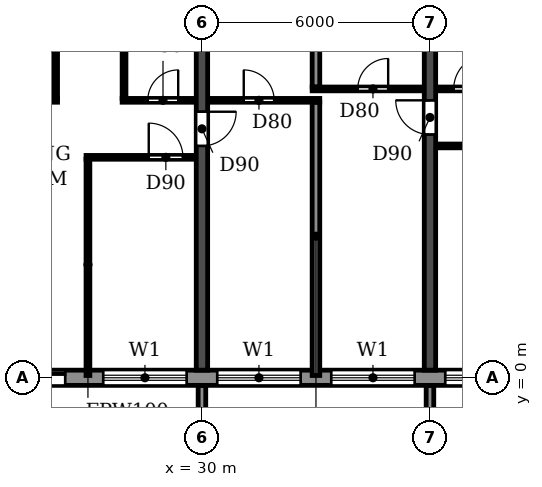
"""IFC4 building model, lengths in metres.
Left out: names, types, materials, properties, quantities, classifications, styles, units other than length and angle.
Written with IfcOpenShell. Run it as: python <this file> out.ifc"""

import sys

from ifc_helpers import new_model, si_unit, direction, frame, frame_2d, origin, place, context, subcontext, project, spatial, polyline, rectangle, outline, extrude, source, transform, mapped, element, fill, save


model = new_model("IFC4")
c1 = context("Model", 3, precision=1e-05, world=origin(), true_north=direction((0.0, 1.0)))
c2 = subcontext(c1, "Body", "Model", "MODEL_VIEW")
j1 = project(units=[si_unit("LENGTHUNIT", "METRE"), si_unit("PLANEANGLEUNIT", "RADIAN")], contexts=[c1])
p1 = place(None, origin())
s1 = spatial("IfcSite", under=j1, at=p1, CompositionType="ELEMENT")
p2 = place(p1, origin())
s2 = spatial("IfcBuilding", under=s1, at=p2, CompositionType="ELEMENT")
p3 = place(p2, frame((0.0, 0.0, 152.1)))
s3 = spatial("IfcBuildingStorey", under=s2, at=p3, CompositionType="ELEMENT", Elevation=152.1)
p4 = place(p3, frame((30.0, 0.2, 0.0), z_axis=(0.0, 0.0, 1.0), x_axis=(0.0, 1.0, 0.0)))
e1 = element("IfcWall", 1, at=p4, inside=s3, PredefinedType="SHEAR", context=c2, shape_type="SweptSolid", body=[
    extrude(rectangle(XDim=11.675, YDim=0.3, at=frame_2d((5.837, 0.0))), origin(), (0.0, 0.0, 1.0), 3.07),
])
p5 = place(p4, frame((5.9, 0.0, 0.0)))
e2 = element("IfcOpeningElement", 2, at=p5, cuts=e1, PredefinedType="OPENING", context=c2, shape_type="SweptSolid", body=[
    extrude(rectangle(XDim=0.9, YDim=2.1, at=frame_2d((0.45, 1.05))), frame((0.0, 0.16, 0.0), z_axis=(0.0, -1.0, 0.0), x_axis=(1.0, 0.0, 0.0)), (0.0, 0.0, 1.0), 0.32),
])
p6 = place(p3, frame((36.0, 0.2, 0.0), z_axis=(0.0, 0.0, 1.0), x_axis=(0.0, 1.0, 0.0)))
e3 = element("IfcWall", 3, at=p6, inside=s3, PredefinedType="SHEAR", context=c2, shape_type="SweptSolid", body=[
    extrude(rectangle(XDim=11.675, YDim=0.3, at=frame_2d((5.837, 0.0))), origin(), (0.0, 0.0, 1.0), 3.07),
])
p7 = place(p6, frame((6.2, 0.0, 0.0)))
e4 = element("IfcOpeningElement", 4, at=p7, cuts=e3, PredefinedType="OPENING", context=c2, shape_type="SweptSolid", body=[
    extrude(rectangle(XDim=0.9, YDim=2.1, at=frame_2d((0.45, 1.05))), frame((0.0, 0.16, 0.0), z_axis=(0.0, -1.0, 0.0), x_axis=(1.0, 0.0, 0.0)), (0.0, 0.0, 1.0), 0.32),
])
p8 = place(p3, frame((16.683, 0.0, 0.0), z_axis=(0.0, 0.0, 1.0), x_axis=(1.0, 0.0, 0.0)))
e5 = element("IfcWall", 5, at=p8, inside=s3, PredefinedType="STANDARD", context=c2, shape_type="SweptSolid", body=[
    extrude(rectangle(XDim=68.634, YDim=0.4, at=frame_2d((34.317, 0.0))), origin(), (0.0, 0.0, 1.0), 3.07),
])
p9 = place(p8, frame((1.717, 0.0, 0.9)))
e6 = element("IfcOpeningElement", 6, at=p9, cuts=e5, PredefinedType="OPENING", context=c2, shape_type="SweptSolid", body=[
    extrude(rectangle(XDim=2.2, YDim=1.5, at=frame_2d((1.1, 0.75))), frame((0.0, 0.21, 0.0), z_axis=(0.0, -1.0, 0.0), x_axis=(1.0, 0.0, 0.0)), (0.0, 0.0, 1.0), 0.42),
])
p10 = place(p8, frame((4.717, 0.0, 0.9)))
e7 = element("IfcOpeningElement", 7, at=p10, cuts=e5, PredefinedType="OPENING", context=c2, shape_type="SweptSolid", body=[
    extrude(rectangle(XDim=2.2, YDim=1.5, at=frame_2d((1.1, 0.75))), frame((0.0, 0.21, 0.0), z_axis=(0.0, -1.0, 0.0), x_axis=(1.0, 0.0, 0.0)), (0.0, 0.0, 1.0), 0.42),
])
p11 = place(p8, frame((7.917, 0.0, 0.0)))
e8 = element("IfcOpeningElement", 8, at=p11, cuts=e5, PredefinedType="OPENING", context=c2, shape_type="SweptSolid", body=[
    extrude(rectangle(XDim=1.8, YDim=2.4, at=frame_2d((0.9, 1.2))), frame((0.0, 0.21, 0.0), z_axis=(0.0, -1.0, 0.0), x_axis=(1.0, 0.0, 0.0)), (0.0, 0.0, 1.0), 0.42),
])
p12 = place(p8, frame((10.717, 0.0, 0.9)))
e9 = element("IfcOpeningElement", 9, at=p12, cuts=e5, PredefinedType="OPENING", context=c2, shape_type="SweptSolid", body=[
    extrude(rectangle(XDim=2.2, YDim=1.5, at=frame_2d((1.1, 0.75))), frame((0.0, 0.21, 0.0), z_axis=(0.0, -1.0, 0.0), x_axis=(1.0, 0.0, 0.0)), (0.0, 0.0, 1.0), 0.42),
])
p13 = place(p8, frame((13.717, 0.0, 0.9)))
e10 = element("IfcOpeningElement", 10, at=p13, cuts=e5, PredefinedType="OPENING", context=c2, shape_type="SweptSolid", body=[
    extrude(rectangle(XDim=2.2, YDim=1.5, at=frame_2d((1.1, 0.75))), frame((0.0, 0.21, 0.0), z_axis=(0.0, -1.0, 0.0), x_axis=(1.0, 0.0, 0.0)), (0.0, 0.0, 1.0), 0.42),
])
p14 = place(p8, frame((16.717, 0.0, 0.9)))
e11 = element("IfcOpeningElement", 11, at=p14, cuts=e5, PredefinedType="OPENING", context=c2, shape_type="SweptSolid", body=[
    extrude(rectangle(XDim=2.2, YDim=1.5, at=frame_2d((1.1, 0.75))), frame((0.0, 0.21, 0.0), z_axis=(0.0, -1.0, 0.0), x_axis=(1.0, 0.0, 0.0)), (0.0, 0.0, 1.0), 0.42),
])
p15 = place(p8, frame((19.717, 0.0, 0.9)))
e12 = element("IfcOpeningElement", 12, at=p15, cuts=e5, PredefinedType="OPENING", context=c2, shape_type="SweptSolid", body=[
    extrude(rectangle(XDim=2.2, YDim=1.5, at=frame_2d((1.1, 0.75))), frame((0.0, 0.21, 0.0), z_axis=(0.0, -1.0, 0.0), x_axis=(1.0, 0.0, 0.0)), (0.0, 0.0, 1.0), 0.42),
])
p16 = place(p8, frame((22.917, 0.0, 0.0)))
e13 = element("IfcOpeningElement", 13, at=p16, cuts=e5, PredefinedType="OPENING", context=c2, shape_type="SweptSolid", body=[
    extrude(rectangle(XDim=1.8, YDim=2.4, at=frame_2d((0.9, 1.2))), frame((0.0, 0.21, 0.0), z_axis=(0.0, -1.0, 0.0), x_axis=(1.0, 0.0, 0.0)), (0.0, 0.0, 1.0), 0.42),
])
p17 = place(p8, frame((25.717, 0.0, 0.9)))
e14 = element("IfcOpeningElement", 14, at=p17, cuts=e5, PredefinedType="OPENING", context=c2, shape_type="SweptSolid", body=[
    extrude(rectangle(XDim=2.2, YDim=1.5, at=frame_2d((1.1, 0.75))), frame((0.0, 0.21, 0.0), z_axis=(0.0, -1.0, 0.0), x_axis=(1.0, 0.0, 0.0)), (0.0, 0.0, 1.0), 0.42),
])
p18 = place(p8, frame((28.717, 0.0, 0.9)))
e15 = element("IfcOpeningElement", 15, at=p18, cuts=e5, PredefinedType="OPENING", context=c2, shape_type="SweptSolid", body=[
    extrude(rectangle(XDim=2.2, YDim=1.5, at=frame_2d((1.1, 0.75))), frame((0.0, 0.21, 0.0), z_axis=(0.0, -1.0, 0.0), x_axis=(1.0, 0.0, 0.0)), (0.0, 0.0, 1.0), 0.42),
])
p19 = place(p8, frame((31.917, 0.0, 0.0)))
e16 = element("IfcOpeningElement", 16, at=p19, cuts=e5, PredefinedType="OPENING", context=c2, shape_type="SweptSolid", body=[
    extrude(rectangle(XDim=1.8, YDim=2.4, at=frame_2d((0.9, 1.2))), frame((0.0, 0.21, 0.0), z_axis=(0.0, -1.0, 0.0), x_axis=(1.0, 0.0, 0.0)), (0.0, 0.0, 1.0), 0.42),
])
p20 = place(p8, frame((34.717, 0.0, 0.9)))
e17 = element("IfcOpeningElement", 17, at=p20, cuts=e5, PredefinedType="OPENING", context=c2, shape_type="SweptSolid", body=[
    extrude(rectangle(XDim=2.2, YDim=1.5, at=frame_2d((1.1, 0.75))), frame((0.0, 0.21, 0.0), z_axis=(0.0, -1.0, 0.0), x_axis=(1.0, 0.0, 0.0)), (0.0, 0.0, 1.0), 0.42),
])
p21 = place(p8, frame((37.717, 0.0, 0.9)))
e18 = element("IfcOpeningElement", 18, at=p21, cuts=e5, PredefinedType="OPENING", context=c2, shape_type="SweptSolid", body=[
    extrude(rectangle(XDim=2.2, YDim=1.5, at=frame_2d((1.1, 0.75))), frame((0.0, 0.21, 0.0), z_axis=(0.0, -1.0, 0.0), x_axis=(1.0, 0.0, 0.0)), (0.0, 0.0, 1.0), 0.42),
])
p22 = place(p8, frame((40.717, 0.0, 0.9)))
e19 = element("IfcOpeningElement", 19, at=p22, cuts=e5, PredefinedType="OPENING", context=c2, shape_type="SweptSolid", body=[
    extrude(rectangle(XDim=2.2, YDim=1.5, at=frame_2d((1.1, 0.75))), frame((0.0, 0.21, 0.0), z_axis=(0.0, -1.0, 0.0), x_axis=(1.0, 0.0, 0.0)), (0.0, 0.0, 1.0), 0.42),
])
p23 = place(p8, frame((43.717, 0.0, 0.9)))
e20 = element("IfcOpeningElement", 20, at=p23, cuts=e5, PredefinedType="OPENING", context=c2, shape_type="SweptSolid", body=[
    extrude(rectangle(XDim=2.2, YDim=1.5, at=frame_2d((1.1, 0.75))), frame((0.0, 0.21, 0.0), z_axis=(0.0, -1.0, 0.0), x_axis=(1.0, 0.0, 0.0)), (0.0, 0.0, 1.0), 0.42),
])
p24 = place(p8, frame((46.917, 0.0, 0.0)))
e21 = element("IfcOpeningElement", 21, at=p24, cuts=e5, PredefinedType="OPENING", context=c2, shape_type="SweptSolid", body=[
    extrude(rectangle(XDim=1.8, YDim=2.4, at=frame_2d((0.9, 1.2))), frame((0.0, 0.21, 0.0), z_axis=(0.0, -1.0, 0.0), x_axis=(1.0, 0.0, 0.0)), (0.0, 0.0, 1.0), 0.42),
])
p25 = place(p8, frame((49.717, 0.0, 0.9)))
e22 = element("IfcOpeningElement", 22, at=p25, cuts=e5, PredefinedType="OPENING", context=c2, shape_type="SweptSolid", body=[
    extrude(rectangle(XDim=2.2, YDim=1.5, at=frame_2d((1.1, 0.75))), frame((0.0, 0.21, 0.0), z_axis=(0.0, -1.0, 0.0), x_axis=(1.0, 0.0, 0.0)), (0.0, 0.0, 1.0), 0.42),
])
p26 = place(p8, frame((52.717, 0.0, 0.9)))
e23 = element("IfcOpeningElement", 23, at=p26, cuts=e5, PredefinedType="OPENING", context=c2, shape_type="SweptSolid", body=[
    extrude(rectangle(XDim=2.2, YDim=1.5, at=frame_2d((1.1, 0.75))), frame((0.0, 0.21, 0.0), z_axis=(0.0, -1.0, 0.0), x_axis=(1.0, 0.0, 0.0)), (0.0, 0.0, 1.0), 0.42),
])
p27 = place(p8, frame((55.717, 0.0, 0.9)))
e24 = element("IfcOpeningElement", 24, at=p27, cuts=e5, PredefinedType="OPENING", context=c2, shape_type="SweptSolid", body=[
    extrude(rectangle(XDim=2.2, YDim=1.5, at=frame_2d((1.1, 0.75))), frame((0.0, 0.21, 0.0), z_axis=(0.0, -1.0, 0.0), x_axis=(1.0, 0.0, 0.0)), (0.0, 0.0, 1.0), 0.42),
])
p28 = place(p8, frame((58.917, 0.0, 0.0)))
e25 = element("IfcOpeningElement", 25, at=p28, cuts=e5, PredefinedType="OPENING", context=c2, shape_type="SweptSolid", body=[
    extrude(rectangle(XDim=1.8, YDim=2.4, at=frame_2d((0.9, 1.2))), frame((0.0, 0.21, 0.0), z_axis=(0.0, -1.0, 0.0), x_axis=(1.0, 0.0, 0.0)), (0.0, 0.0, 1.0), 0.42),
])
p29 = place(p8, frame((61.717, 0.0, 0.9)))
e26 = element("IfcOpeningElement", 26, at=p29, cuts=e5, PredefinedType="OPENING", context=c2, shape_type="SweptSolid", body=[
    extrude(rectangle(XDim=2.2, YDim=1.5, at=frame_2d((1.1, 0.75))), frame((0.0, 0.21, 0.0), z_axis=(0.0, -1.0, 0.0), x_axis=(1.0, 0.0, 0.0)), (0.0, 0.0, 1.0), 0.42),
])
p30 = place(p8, frame((64.717, 0.0, 0.9)))
e27 = element("IfcOpeningElement", 27, at=p30, cuts=e5, PredefinedType="OPENING", context=c2, shape_type="SweptSolid", body=[
    extrude(rectangle(XDim=2.2, YDim=1.5, at=frame_2d((1.1, 0.75))), frame((0.0, 0.21, 0.0), z_axis=(0.0, -1.0, 0.0), x_axis=(1.0, 0.0, 0.0)), (0.0, 0.0, 1.0), 0.42),
])
m1 = source(origin(), c2, "Body", "SweptSolid", [
    extrude(outline(polyline([(0.0, 0.0), (0.2, 0.0), (0.2, 1.65), (0.0, 1.65), (0.0, 0.0)])), origin(), (0.0, 0.0, 1.0), 3.1),
])
for number, where in (
    (28, (29.9, -1.85, 0.0)),
    (29, (35.9, -1.85, 0.0)),
):
    element("IfcWall", number, at=place(p3, frame(where)), inside=s3, PredefinedType="STANDARD", context=c2, shape_type="MappedRepresentation", body=[
        mapped(m1, transform((0.0, 0.0, 0.0))),
    ])
p31 = place(p3, frame((33.0, 0.06, 0.0), z_axis=(0.0, 0.0, 1.0), x_axis=(0.0, 1.0, 0.0)))
e30 = element("IfcWall", 30, at=p31, inside=s3, PredefinedType="PARTITIONING", context=c2, shape_type="SweptSolid", body=[
    extrude(rectangle(XDim=7.19, YDim=0.2, at=frame_2d((3.595, 0.0))), origin(), (0.0, 0.0, 1.0), 3.07),
])
p32 = place(p3, frame((33.0, 7.65, 0.0), z_axis=(0.0, 0.0, 1.0), x_axis=(0.0, 1.0, 0.0)))
e31 = element("IfcWall", 31, at=p32, inside=s3, PredefinedType="PARTITIONING", context=c2, shape_type="SweptSolid", body=[
    extrude(rectangle(XDim=4.215, YDim=0.2, at=frame_2d((2.107, 0.0))), origin(), (0.0, 0.0, 1.0), 3.07),
])
p33 = place(p3, frame((26.95, 5.8, 0.0), z_axis=(0.0, 0.0, 1.0), x_axis=(1.0, 0.0, 0.0)))
e32 = element("IfcWall", 32, at=p33, inside=s3, PredefinedType="PARTITIONING", context=c2, shape_type="SweptSolid", body=[
    extrude(rectangle(XDim=2.89, YDim=0.1, at=frame_2d((1.445, 0.0))), origin(), (0.0, 0.0, 1.0), 3.07),
])
p34 = place(p33, frame((1.65, 0.0, 0.0)))
e33 = element("IfcOpeningElement", 33, at=p34, cuts=e32, PredefinedType="OPENING", context=c2, shape_type="SweptSolid", body=[
    extrude(rectangle(XDim=0.9, YDim=2.1, at=frame_2d((0.45, 1.05))), frame((0.0, 0.06, 0.0), z_axis=(0.0, -1.0, 0.0), x_axis=(1.0, 0.0, 0.0)), (0.0, 0.0, 1.0), 0.12),
])
p35 = place(p3, frame((36.16, 6.1, 0.0), z_axis=(0.0, 0.0, 1.0), x_axis=(1.0, 0.0, 0.0)))
e34 = element("IfcWall", 34, at=p35, inside=s3, PredefinedType="PARTITIONING", context=c2, shape_type="SweptSolid", body=[
    extrude(rectangle(XDim=2.89, YDim=0.1, at=frame_2d((1.445, 0.0))), origin(), (0.0, 0.0, 1.0), 3.07),
])
p36 = place(p35, frame((1.44, 0.0, 0.0)))
e35 = element("IfcOpeningElement", 35, at=p36, cuts=e34, PredefinedType="OPENING", context=c2, shape_type="SweptSolid", body=[
    extrude(rectangle(XDim=0.9, YDim=2.1, at=frame_2d((0.45, 1.05))), frame((0.0, 0.06, 0.0), z_axis=(0.0, -1.0, 0.0), x_axis=(1.0, 0.0, 0.0)), (0.0, 0.0, 1.0), 0.12),
])
p37 = place(p3, frame((24.16, 7.3, 0.0), z_axis=(0.0, 0.0, 1.0), x_axis=(1.0, 0.0, 0.0)))
e36 = element("IfcWall", 36, at=p37, inside=s3, PredefinedType="PARTITIONING", context=c2, shape_type="SweptSolid", body=[
    extrude(rectangle(XDim=2.04, YDim=0.1, at=frame_2d((1.02, 0.0))), origin(), (0.0, 0.0, 1.0), 3.07),
])
p38 = place(p37, frame((0.465, 0.0, 0.0)))
e37 = element("IfcOpeningElement", 37, at=p38, cuts=e36, PredefinedType="OPENING", context=c2, shape_type="SweptSolid", body=[
    extrude(rectangle(XDim=0.9, YDim=2.1, at=frame_2d((0.45, 1.05))), frame((0.0, 0.06, 0.0), z_axis=(0.0, -1.0, 0.0), x_axis=(1.0, 0.0, 0.0)), (0.0, 0.0, 1.0), 0.12),
])
p39 = place(p3, frame((27.9, 7.3, 0.0), z_axis=(0.0, 0.0, 1.0), x_axis=(1.0, 0.0, 0.0)))
e38 = element("IfcWall", 38, at=p39, inside=s3, PredefinedType="PARTITIONING", context=c2, shape_type="SweptSolid", body=[
    extrude(rectangle(XDim=1.94, YDim=0.1, at=frame_2d((0.97, 0.0))), origin(), (0.0, 0.0, 1.0), 3.07),
])
p40 = place(p39, frame((0.675, 0.0, 0.0)))
e39 = element("IfcOpeningElement", 39, at=p40, cuts=e38, PredefinedType="OPENING", context=c2, shape_type="SweptSolid", body=[
    extrude(rectangle(XDim=0.8, YDim=2.1, at=frame_2d((0.4, 1.05))), frame((0.0, 0.06, 0.0), z_axis=(0.0, -1.0, 0.0), x_axis=(1.0, 0.0, 0.0)), (0.0, 0.0, 1.0), 0.12),
])
p41 = place(p3, frame((30.16, 7.3, 0.0), z_axis=(0.0, 0.0, 1.0), x_axis=(1.0, 0.0, 0.0)))
e40 = element("IfcWall", 40, at=p41, inside=s3, PredefinedType="PARTITIONING", context=c2, shape_type="SweptSolid", body=[
    extrude(rectangle(XDim=2.94, YDim=0.1, at=frame_2d((1.47, 0.0))), origin(), (0.0, 0.0, 1.0), 3.07),
])
p42 = place(p41, frame((0.94, 0.0, 0.0)))
e41 = element("IfcOpeningElement", 41, at=p42, cuts=e40, PredefinedType="OPENING", context=c2, shape_type="SweptSolid", body=[
    extrude(rectangle(XDim=0.8, YDim=2.1, at=frame_2d((0.4, 1.05))), frame((0.0, 0.06, 0.0), z_axis=(0.0, -1.0, 0.0), x_axis=(1.0, 0.0, 0.0)), (0.0, 0.0, 1.0), 0.12),
])
p43 = place(p3, frame((32.9, 7.6, 0.0), z_axis=(0.0, 0.0, 1.0), x_axis=(1.0, 0.0, 0.0)))
e42 = element("IfcWall", 42, at=p43, inside=s3, PredefinedType="PARTITIONING", context=c2, shape_type="SweptSolid", body=[
    extrude(rectangle(XDim=2.94, YDim=0.1, at=frame_2d((1.47, 0.0))), origin(), (0.0, 0.0, 1.0), 3.07),
])
p44 = place(p43, frame((1.2, 0.0, 0.0)))
e43 = element("IfcOpeningElement", 43, at=p44, cuts=e42, PredefinedType="OPENING", context=c2, shape_type="SweptSolid", body=[
    extrude(rectangle(XDim=0.8, YDim=2.1, at=frame_2d((0.4, 1.05))), frame((0.0, 0.06, 0.0), z_axis=(0.0, -1.0, 0.0), x_axis=(1.0, 0.0, 0.0)), (0.0, 0.0, 1.0), 0.12),
])
p45 = place(p3, frame((36.16, 7.6, 0.0), z_axis=(0.0, 0.0, 1.0), x_axis=(1.0, 0.0, 0.0)))
e44 = element("IfcWall", 44, at=p45, inside=s3, PredefinedType="PARTITIONING", context=c2, shape_type="SweptSolid", body=[
    extrude(rectangle(XDim=2.04, YDim=0.1, at=frame_2d((1.02, 0.0))), origin(), (0.0, 0.0, 1.0), 3.07),
])
p46 = place(p45, frame((0.465, 0.0, 0.0)))
e45 = element("IfcOpeningElement", 45, at=p46, cuts=e44, PredefinedType="OPENING", context=c2, shape_type="SweptSolid", body=[
    extrude(rectangle(XDim=0.9, YDim=2.1, at=frame_2d((0.45, 1.05))), frame((0.0, 0.06, 0.0), z_axis=(0.0, -1.0, 0.0), x_axis=(1.0, 0.0, 0.0)), (0.0, 0.0, 1.0), 0.12),
])
p47 = place(p3, frame((26.15, 7.35, 0.0), z_axis=(0.0, 0.0, 1.0), x_axis=(0.0, 1.0, 0.0)))
e46 = element("IfcWall", 46, at=p47, inside=s3, PredefinedType="PARTITIONING", context=c2, shape_type="SweptSolid", body=[
    extrude(rectangle(XDim=4.515, YDim=0.1, at=frame_2d((2.257, 0.0))), origin(), (0.0, 0.0, 1.0), 3.07),
])
p48 = place(p3, frame((27.0, 0.06, 0.0), z_axis=(0.0, 0.0, 1.0), x_axis=(0.0, 1.0, 0.0)))
e47 = element("IfcWall", 47, at=p48, inside=s3, PredefinedType="PARTITIONING", context=c2, shape_type="SweptSolid", body=[
    extrude(rectangle(XDim=5.69, YDim=0.1, at=frame_2d((2.845, 0.0))), origin(), (0.0, 0.0, 1.0), 3.07),
])
p49 = place(p3, frame((27.95, 7.35, 0.0), z_axis=(0.0, 0.0, 1.0), x_axis=(0.0, 1.0, 0.0)))
e48 = element("IfcWall", 48, at=p49, inside=s3, PredefinedType="PARTITIONING", context=c2, shape_type="SweptSolid", body=[
    extrude(rectangle(XDim=4.515, YDim=0.1, at=frame_2d((2.257, 0.0))), origin(), (0.0, 0.0, 1.0), 3.07),
])
p50 = place(p11, origin())
e49 = element("IfcDoor", 49, at=p50, inside=s3, OperationType="DOUBLE_DOOR_SLIDING", PredefinedType="DOOR", context=c2, shape_type="SweptSolid", body=[
    extrude(rectangle(XDim=1.8, YDim=2.4, at=frame_2d((0.9, 1.2))), frame((0.0, 0.025, 0.0), z_axis=(0.0, -1.0, 0.0), x_axis=(1.0, 0.0, 0.0)), (0.0, 0.0, 1.0), 0.05),
])
fill(e8, e49)
p51 = place(p12, origin())
e50 = element("IfcWindow", 50, at=p51, inside=s3, PartitioningType="DOUBLE_PANEL_HORIZONTAL", PredefinedType="WINDOW", context=c2, shape_type="SweptSolid", body=[
    extrude(rectangle(XDim=2.2, YDim=1.5, at=frame_2d((1.1, 0.75))), frame((0.0, 0.03, 0.0), z_axis=(0.0, -1.0, 0.0), x_axis=(1.0, 0.0, 0.0)), (0.0, 0.0, 1.0), 0.06),
])
fill(e9, e50)
p52 = place(p13, origin())
e51 = element("IfcWindow", 51, at=p52, inside=s3, PartitioningType="DOUBLE_PANEL_HORIZONTAL", PredefinedType="WINDOW", context=c2, shape_type="SweptSolid", body=[
    extrude(rectangle(XDim=2.2, YDim=1.5, at=frame_2d((1.1, 0.75))), frame((0.0, 0.03, 0.0), z_axis=(0.0, -1.0, 0.0), x_axis=(1.0, 0.0, 0.0)), (0.0, 0.0, 1.0), 0.06),
])
fill(e10, e51)
p53 = place(p14, origin())
e52 = element("IfcWindow", 52, at=p53, inside=s3, PartitioningType="DOUBLE_PANEL_HORIZONTAL", PredefinedType="WINDOW", context=c2, shape_type="SweptSolid", body=[
    extrude(rectangle(XDim=2.2, YDim=1.5, at=frame_2d((1.1, 0.75))), frame((0.0, 0.03, 0.0), z_axis=(0.0, -1.0, 0.0), x_axis=(1.0, 0.0, 0.0)), (0.0, 0.0, 1.0), 0.06),
])
fill(e11, e52)
p54 = place(p15, origin())
e53 = element("IfcWindow", 53, at=p54, inside=s3, PartitioningType="DOUBLE_PANEL_HORIZONTAL", PredefinedType="WINDOW", context=c2, shape_type="SweptSolid", body=[
    extrude(rectangle(XDim=2.2, YDim=1.5, at=frame_2d((1.1, 0.75))), frame((0.0, 0.03, 0.0), z_axis=(0.0, -1.0, 0.0), x_axis=(1.0, 0.0, 0.0)), (0.0, 0.0, 1.0), 0.06),
])
fill(e12, e53)
p55 = place(p42, origin())
e54 = element("IfcDoor", 54, at=p55, inside=s3, OperationType="SINGLE_SWING_LEFT", PredefinedType="DOOR", context=c2, shape_type="SweptSolid", body=[
    extrude(rectangle(XDim=0.8, YDim=2.1, at=frame_2d((0.4, 1.05))), frame((0.0, 0.025, 0.0), z_axis=(0.0, -1.0, 0.0), x_axis=(1.0, 0.0, 0.0)), (0.0, 0.0, 1.0), 0.05),
])
fill(e41, e54)
p56 = place(p40, origin())
e55 = element("IfcDoor", 55, at=p56, inside=s3, OperationType="SINGLE_SWING_RIGHT", PredefinedType="DOOR", context=c2, shape_type="SweptSolid", body=[
    extrude(rectangle(XDim=0.8, YDim=2.1, at=frame_2d((0.4, 1.05))), frame((0.0, 0.025, 0.0), z_axis=(0.0, -1.0, 0.0), x_axis=(1.0, 0.0, 0.0)), (0.0, 0.0, 1.0), 0.05),
])
fill(e39, e55)
p57 = place(p34, origin())
e56 = element("IfcDoor", 56, at=p57, inside=s3, OperationType="SINGLE_SWING_LEFT", PredefinedType="DOOR", context=c2, shape_type="SweptSolid", body=[
    extrude(rectangle(XDim=0.9, YDim=2.1, at=frame_2d((0.45, 1.05))), frame((0.0, 0.025, 0.0), z_axis=(0.0, -1.0, 0.0), x_axis=(1.0, 0.0, 0.0)), (0.0, 0.0, 1.0), 0.05),
])
fill(e33, e56)
p58 = place(p5, frame((0.9, 0.0, 0.0), z_axis=(0.0, 0.0, 1.0), x_axis=(-1.0, 0.0, 0.0)))
e57 = element("IfcDoor", 57, at=p58, inside=s3, OperationType="SINGLE_SWING_LEFT", PredefinedType="DOOR", context=c2, shape_type="SweptSolid", body=[
    extrude(rectangle(XDim=0.9, YDim=2.1, at=frame_2d((0.45, 1.05))), frame((0.0, 0.025, 0.0), z_axis=(0.0, -1.0, 0.0), x_axis=(1.0, 0.0, 0.0)), (0.0, 0.0, 1.0), 0.05),
])
fill(e2, e57)
p59 = place(p44, origin())
e58 = element("IfcDoor", 58, at=p59, inside=s3, OperationType="SINGLE_SWING_RIGHT", PredefinedType="DOOR", context=c2, shape_type="SweptSolid", body=[
    extrude(rectangle(XDim=0.8, YDim=2.1, at=frame_2d((0.4, 1.05))), frame((0.0, 0.025, 0.0), z_axis=(0.0, -1.0, 0.0), x_axis=(1.0, 0.0, 0.0)), (0.0, 0.0, 1.0), 0.05),
])
fill(e43, e58)
p60 = place(p7, origin())
e59 = element("IfcDoor", 59, at=p60, inside=s3, OperationType="SINGLE_SWING_RIGHT", PredefinedType="DOOR", context=c2, shape_type="SweptSolid", body=[
    extrude(rectangle(XDim=0.9, YDim=2.1, at=frame_2d((0.45, 1.05))), frame((0.0, 0.025, 0.0), z_axis=(0.0, -1.0, 0.0), x_axis=(1.0, 0.0, 0.0)), (0.0, 0.0, 1.0), 0.05),
])
fill(e4, e59)
p61 = place(p46, origin())
e60 = element("IfcDoor", 60, at=p61, inside=s3, OperationType="SINGLE_SWING_RIGHT", PredefinedType="DOOR", context=c2, shape_type="SweptSolid", body=[
    extrude(rectangle(XDim=0.9, YDim=2.1, at=frame_2d((0.45, 1.05))), frame((0.0, 0.025, 0.0), z_axis=(0.0, -1.0, 0.0), x_axis=(1.0, 0.0, 0.0)), (0.0, 0.0, 1.0), 0.05),
])
fill(e45, e60)
save(model, sys.argv[1])
